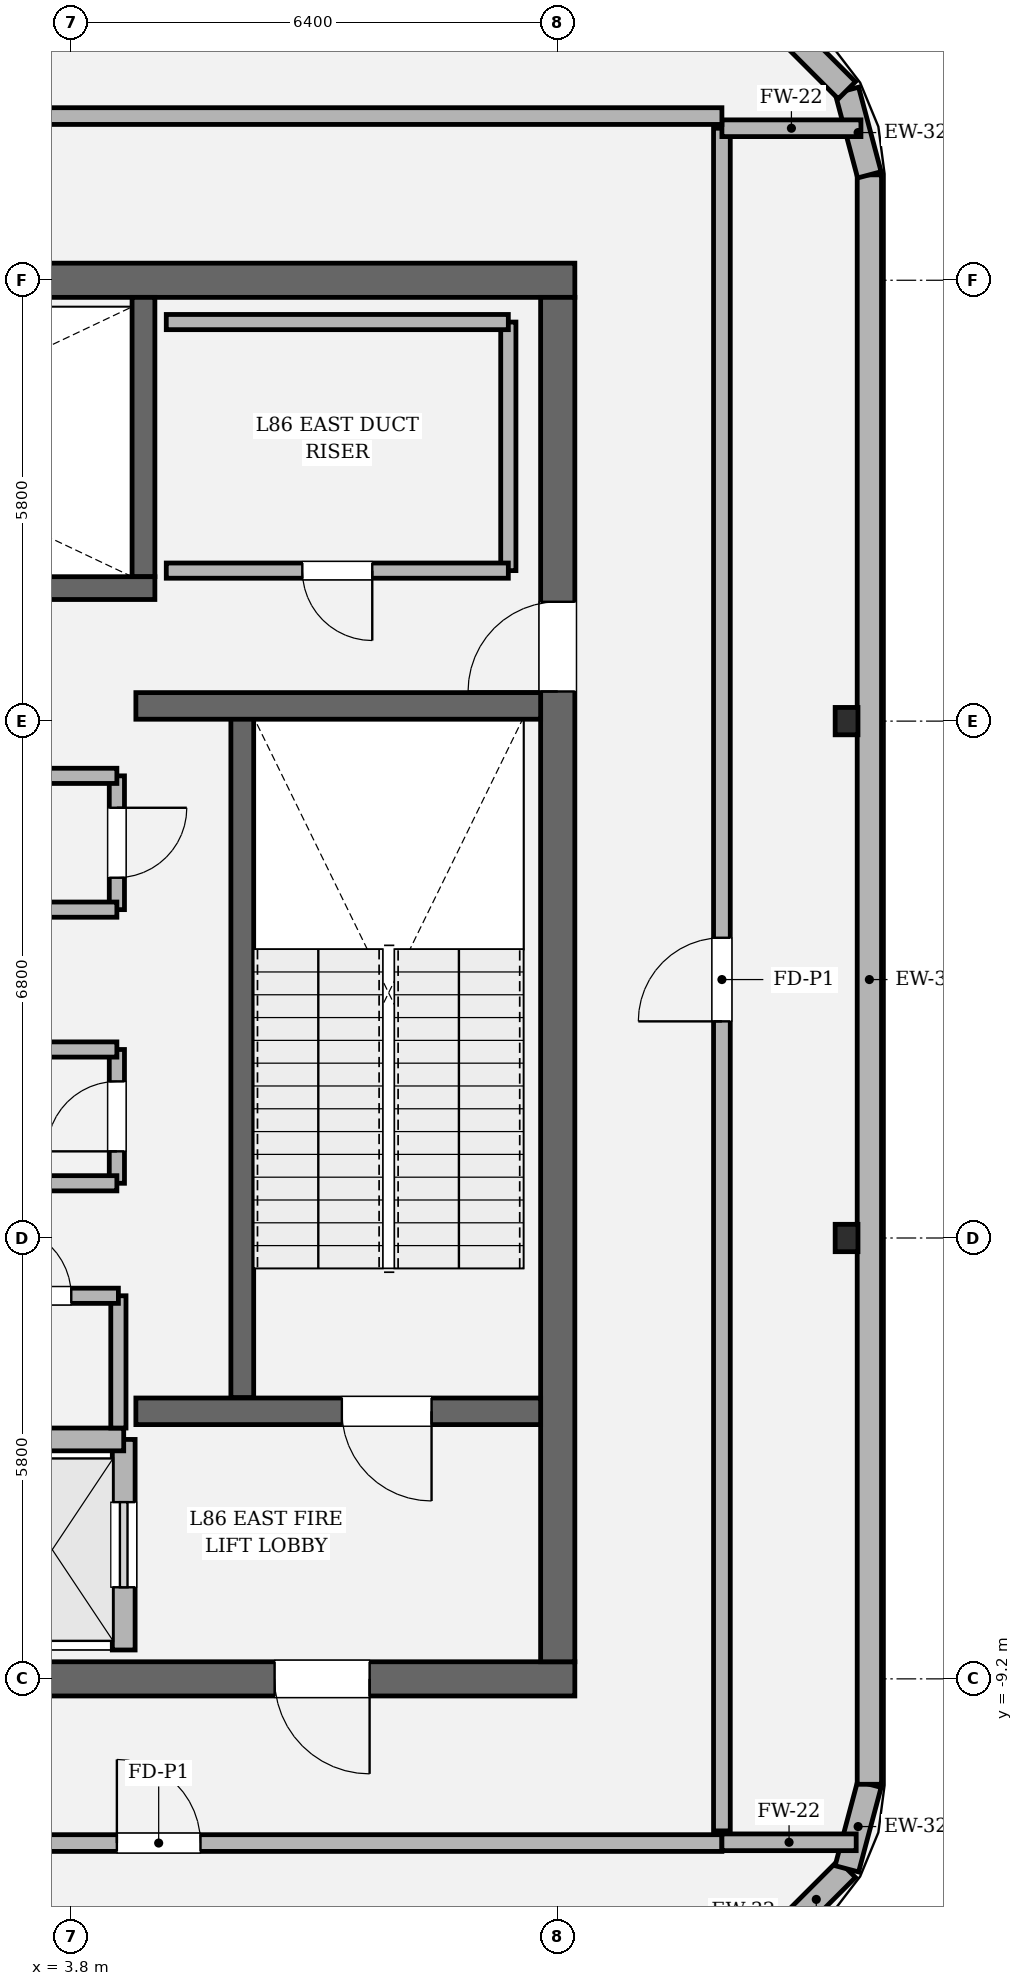
"""IFC4 building model, lengths in metres.
Left out: names, types, materials, properties, quantities, classifications, styles, units other than length and angle.
Written with IfcOpenShell. Run it as: python <this file> out.ifc"""

import sys

from ifc_helpers import new_model, si_unit, direction, frame, frame_2d, origin, origin_2d, place, context, subcontext, project, spatial, rectangle, i_section, extrude, element, fill, save


model = new_model("IFC4")
c1 = context("Model", 3, precision=1e-05, world=origin(), true_north=direction((0.0, 1.0)))
c2 = subcontext(c1, "Body", "Model", "MODEL_VIEW")
j1 = project(units=[si_unit("LENGTHUNIT", "METRE"), si_unit("PLANEANGLEUNIT", "RADIAN")], contexts=[c1])
p1 = place(None, origin())
s1 = spatial("IfcSite", under=j1, at=p1, CompositionType="ELEMENT")
p2 = place(p1, origin())
s2 = spatial("IfcBuilding", under=s1, at=p2, CompositionType="ELEMENT")
p3 = place(p2, frame((0.0, 0.0, 366.3)))
s3 = spatial("IfcBuildingStorey", under=s2, at=p3, CompositionType="ELEMENT", Elevation=366.3)
p4 = place(p3, frame((10.425, -9.2, 0.0), z_axis=(0.0, 0.0, 1.0), x_axis=(-1.0, 0.0, 0.0)))
e1 = element("IfcWall", 1, at=p4, inside=s3, PredefinedType="SHEAR", context=c2, shape_type="SweptSolid", body=[
    extrude(rectangle(XDim=20.85, YDim=0.45, at=frame_2d((10.425, 0.0))), origin(), (0.0, 0.0, 1.0), 4.5),
])
p5 = place(p4, frame((2.7, 0.0, 0.0)))
e2 = element("IfcOpeningElement", 2, at=p5, cuts=e1, PredefinedType="OPENING", context=c2, shape_type="SweptSolid", body=[
    extrude(rectangle(XDim=1.25, YDim=2.25, at=frame_2d((0.625, 1.125))), frame((0.0, 0.235, 0.0), z_axis=(0.0, -1.0, 0.0), x_axis=(1.0, 0.0, 0.0)), (0.0, 0.0, 1.0), 0.47),
])
p6 = place(p4, frame((16.9, 0.0, 0.0)))
e3 = element("IfcOpeningElement", 3, at=p6, cuts=e1, PredefinedType="OPENING", context=c2, shape_type="SweptSolid", body=[
    extrude(rectangle(XDim=1.25, YDim=2.25, at=frame_2d((0.625, 1.125))), frame((0.0, 0.235, 0.0), z_axis=(0.0, -1.0, 0.0), x_axis=(1.0, 0.0, 0.0)), (0.0, 0.0, 1.0), 0.47),
])
p7 = place(p3, frame((-10.425, 9.2, 0.0), z_axis=(0.0, 0.0, 1.0), x_axis=(1.0, 0.0, 0.0)))
e4 = element("IfcWall", 4, at=p7, inside=s3, PredefinedType="SHEAR", context=c2, shape_type="SweptSolid", body=[
    extrude(rectangle(XDim=20.85, YDim=0.45, at=frame_2d((10.425, 0.0))), origin(), (0.0, 0.0, 1.0), 4.5),
])
p8 = place(p3, frame((10.2, 8.975, 0.0), z_axis=(0.0, 0.0, 1.0), x_axis=(0.0, -1.0, 0.0)))
e5 = element("IfcWall", 5, at=p8, inside=s3, PredefinedType="SHEAR", context=c2, shape_type="SweptSolid", body=[
    extrude(rectangle(XDim=17.95, YDim=0.45, at=frame_2d((8.975, 0.0))), origin(), (0.0, 0.0, 1.0), 4.5),
])
p9 = place(p8, frame((4.005, 0.0, 0.0)))
e6 = element("IfcOpeningElement", 6, at=p9, cuts=e5, PredefinedType="OPENING", context=c2, shape_type="SweptSolid", body=[
    extrude(rectangle(XDim=1.18, YDim=2.2, at=frame_2d((0.59, 1.1))), frame((0.0, 0.235, 0.0), z_axis=(0.0, -1.0, 0.0), x_axis=(1.0, 0.0, 0.0)), (0.0, 0.0, 1.0), 0.47),
])
p10 = place(p3, frame((6.05, 3.45, 0.0), z_axis=(0.0, 0.0, 1.0), x_axis=(0.0, -1.0, 0.0)))
e7 = element("IfcWall", 7, at=p10, inside=s3, PredefinedType="SOLIDWALL", context=c2, shape_type="SweptSolid", body=[
    extrude(rectangle(XDim=8.95, YDim=0.3, at=frame_2d((4.475, 0.0))), origin(), (0.0, 0.0, 1.0), 4.5),
])
p11 = place(p3, frame((4.75, 8.975, 0.0), z_axis=(0.0, 0.0, 1.0), x_axis=(0.0, -1.0, 0.0)))
e8 = element("IfcWall", 8, at=p11, inside=s3, PredefinedType="SOLIDWALL", context=c2, shape_type="SweptSolid", body=[
    extrude(rectangle(XDim=3.675, YDim=0.3, at=frame_2d((1.837, 0.0))), origin(), (0.0, 0.0, 1.0), 4.5),
])
p12 = place(p3, frame((-4.9, 5.15, 0.0), z_axis=(0.0, 0.0, 1.0), x_axis=(1.0, 0.0, 0.0)))
e9 = element("IfcWall", 9, at=p12, inside=s3, PredefinedType="SOLIDWALL", context=c2, shape_type="SweptSolid", body=[
    extrude(rectangle(XDim=9.8, YDim=0.3, at=frame_2d((4.9, 0.0))), origin(), (0.0, 0.0, 1.0), 4.5),
])
p13 = place(p12, frame((0.56, 0.0, 0.0)))
e10 = element("IfcOpeningElement", 10, at=p13, cuts=e9, PredefinedType="OPENING", context=c2, shape_type="SweptSolid", body=[
    extrude(rectangle(XDim=1.18, YDim=2.2, at=frame_2d((0.59, 1.1))), frame((0.0, 0.16, 0.0), z_axis=(0.0, -1.0, 0.0), x_axis=(1.0, 0.0, 0.0)), (0.0, 0.0, 1.0), 0.32),
])
p14 = place(p3, frame((4.65, -5.68, 0.0), z_axis=(0.0, 0.0, 1.0), x_axis=(1.0, 0.0, 0.0)))
e11 = element("IfcWall", 11, at=p14, inside=s3, PredefinedType="SOLIDWALL", context=c2, shape_type="SweptSolid", body=[
    extrude(rectangle(XDim=5.325, YDim=0.35, at=frame_2d((2.663, 0.0))), origin(), (0.0, 0.0, 1.0), 4.5),
])
p15 = place(p14, frame((2.71, 0.0, 0.0)))
e12 = element("IfcOpeningElement", 12, at=p15, cuts=e11, PredefinedType="OPENING", context=c2, shape_type="SweptSolid", body=[
    extrude(rectangle(XDim=1.18, YDim=2.2, at=frame_2d((0.59, 1.1))), frame((0.0, 0.185, 0.0), z_axis=(0.0, -1.0, 0.0), x_axis=(1.0, 0.0, 0.0)), (0.0, 0.0, 1.0), 0.37),
])
p16 = place(p3, frame((4.65, 3.6, 0.0), z_axis=(0.0, 0.0, 1.0), x_axis=(1.0, 0.0, 0.0)))
e13 = element("IfcWall", 13, at=p16, inside=s3, PredefinedType="SOLIDWALL", context=c2, shape_type="SweptSolid", body=[
    extrude(rectangle(XDim=5.325, YDim=0.35, at=frame_2d((2.663, 0.0))), origin(), (0.0, 0.0, 1.0), 4.5),
])
for number, where, z_axis, x_axis in (
    (14, (14.0, -3.4, 0.0), (0.0, 0.0, 1.0), (1.0, 0.0, 0.0)),
    (15, (14.0, 3.4, 0.0), (0.0, 0.0, 1.0), (1.0, 0.0, 0.0)),
):
    element("IfcColumn", number, at=place(p3, frame(where, z_axis=z_axis, x_axis=x_axis)), inside=s3, PredefinedType="COLUMN", context=c2, shape_type="SweptSolid", body=[
        extrude(i_section(OverallWidth=0.3, OverallDepth=0.36, WebThickness=0.012, FlangeThickness=0.022, FilletRadius=0.018, at=origin_2d()), origin(), (0.0, 0.0, 1.0), 4.498),
    ])
p17 = place(p3, frame((13.199, -12.504, 0.0), z_axis=(0.0, 0.0, 1.0), x_axis=(0.707106781187, 0.707106781187, 0.0)))
e16 = element("IfcWall", 16, at=p17, inside=s3, PredefinedType="SOLIDWALL", context=c2, shape_type="SweptSolid", body=[
    extrude(rectangle(XDim=1.138, YDim=0.32, at=frame_2d((0.569, 0.0))), origin(), (0.0, 0.0, 1.0), 3.924),
])
p18 = place(p3, frame((14.004, -11.699, 0.0), z_axis=(0.0, 0.0, 1.0), x_axis=(0.25727979053, 0.966336954372, 0.0)))
e17 = element("IfcWall", 17, at=p18, inside=s3, PredefinedType="SOLIDWALL", context=c2, shape_type="SweptSolid", body=[
    extrude(rectangle(XDim=1.151, YDim=0.32, at=frame_2d((0.576, 0.0))), origin(), (0.0, 0.0, 1.0), 3.924),
])
p19 = place(p3, frame((14.3, -10.587, 0.0), z_axis=(0.0, 0.0, 1.0), x_axis=(0.0, 1.0, 0.0)))
e18 = element("IfcWall", 18, at=p19, inside=s3, PredefinedType="SOLIDWALL", context=c2, shape_type="SweptSolid", body=[
    extrude(rectangle(XDim=21.174, YDim=0.32, at=frame_2d((10.587, 0.0))), origin(), (0.0, 0.0, 1.0), 3.924),
])
p20 = place(p3, frame((14.3, 10.587, 0.0), z_axis=(0.0, 0.0, 1.0), x_axis=(-0.25727979053, 0.966336954372, 0.0)))
e19 = element("IfcWall", 19, at=p20, inside=s3, PredefinedType="SOLIDWALL", context=c2, shape_type="SweptSolid", body=[
    extrude(rectangle(XDim=1.151, YDim=0.32, at=frame_2d((0.576, 0.0))), origin(), (0.0, 0.0, 1.0), 3.924),
])
p21 = place(p3, frame((14.004, 11.699, 0.0), z_axis=(0.0, 0.0, 1.0), x_axis=(-0.707106781187, 0.707106781187, 0.0)))
e20 = element("IfcWall", 20, at=p21, inside=s3, PredefinedType="SOLIDWALL", context=c2, shape_type="SweptSolid", body=[
    extrude(rectangle(XDim=1.138, YDim=0.32, at=frame_2d((0.569, 0.0))), origin(), (0.0, 0.0, 1.0), 3.924),
])
p22 = place(p3, frame((4.49, -8.82, 0.0), z_axis=(0.0, 0.0, 1.0), x_axis=(0.0, 1.0, 0.0)))
e21 = element("IfcWall", 21, at=p22, inside=s3, PredefinedType="SOLIDWALL", context=c2, shape_type="SweptSolid", body=[
    extrude(rectangle(XDim=2.77, YDim=0.3, at=frame_2d((1.385, 0.0))), origin(), (0.0, 0.0, 1.0), 4.25),
])
p23 = place(p22, frame((0.825, 0.0, 0.0)))
e22 = element("IfcOpeningElement", 22, at=p23, cuts=e21, PredefinedType="OPENING", context=c2, shape_type="SweptSolid", body=[
    extrude(rectangle(XDim=1.12, YDim=2.25, at=frame_2d((0.56, 1.125))), frame((0.0, 0.16, 0.0), z_axis=(0.0, -1.0, 0.0), x_axis=(1.0, 0.0, 0.0)), (0.0, 0.0, 1.0), 0.32),
])
p24 = place(p3, frame((2.61, -6.05, 0.0), z_axis=(0.0, 0.0, 1.0), x_axis=(1.0, 0.0, 0.0)))
e23 = element("IfcWall", 23, at=p24, inside=s3, PredefinedType="SOLIDWALL", context=c2, shape_type="SweptSolid", body=[
    extrude(rectangle(XDim=1.88, YDim=0.3, at=frame_2d((0.94, 0.0))), origin(), (0.0, 0.0, 1.0), 4.25),
])
p25 = place(p3, frame((4.42, -5.9, 0.0), z_axis=(0.0, 0.0, 1.0), x_axis=(0.0, 1.0, 0.0)))
e24 = element("IfcWall", 24, at=p25, inside=s3, PredefinedType="SOLIDWALL", context=c2, shape_type="SweptSolid", body=[
    extrude(rectangle(XDim=1.74, YDim=0.2, at=frame_2d((0.87, 0.0))), origin(), (0.0, 0.0, 1.0), 4.25),
])
p26 = place(p3, frame((4.42, -4.16, 0.0), z_axis=(0.0, 0.0, 1.0), x_axis=(-1.0, 0.0, 0.0)))
e25 = element("IfcWall", 25, at=p26, inside=s3, PredefinedType="SOLIDWALL", context=c2, shape_type="SweptSolid", body=[
    extrude(rectangle(XDim=2.16, YDim=0.2, at=frame_2d((1.08, 0.0))), origin(), (0.0, 0.0, 1.0), 4.25),
])
p27 = place(p26, frame((0.62, 0.0, 0.0)))
e26 = element("IfcOpeningElement", 26, at=p27, cuts=e25, PredefinedType="OPENING", context=c2, shape_type="SweptSolid", body=[
    extrude(rectangle(XDim=0.92, YDim=2.1, at=frame_2d((0.46, 1.05))), frame((0.0, 0.11, 0.0), z_axis=(0.0, -1.0, 0.0), x_axis=(1.0, 0.0, 0.0)), (0.0, 0.0, 1.0), 0.22),
])
p28 = place(p3, frame((4.4, -2.68, 0.0), z_axis=(0.0, 0.0, 1.0), x_axis=(0.0, 1.0, 0.0)))
e27 = element("IfcWall", 27, at=p28, inside=s3, PredefinedType="SOLIDWALL", context=c2, shape_type="SweptSolid", body=[
    extrude(rectangle(XDim=1.76, YDim=0.2, at=frame_2d((0.88, 0.0))), origin(), (0.0, 0.0, 1.0), 4.25),
])
p29 = place(p28, frame((0.42, 0.0, 0.0)))
e28 = element("IfcOpeningElement", 28, at=p29, cuts=e27, PredefinedType="OPENING", context=c2, shape_type="SweptSolid", body=[
    extrude(rectangle(XDim=0.92, YDim=2.1, at=frame_2d((0.46, 1.05))), frame((0.0, 0.11, 0.0), z_axis=(0.0, -1.0, 0.0), x_axis=(1.0, 0.0, 0.0)), (0.0, 0.0, 1.0), 0.22),
])
for number, where, z_axis, x_axis in (
    (29, (4.4, -0.92, 0.0), (0.0, 0.0, 1.0), (-1.0, 0.0, 0.0)),
    (30, (-4.4, -2.68, 0.0), (0.0, 0.0, 1.0), (1.0, 0.0, 0.0)),
):
    element("IfcWall", number, at=place(p3, frame(where, z_axis=z_axis, x_axis=x_axis)), inside=s3, PredefinedType="SOLIDWALL", context=c2, shape_type="SweptSolid", body=[
        extrude(rectangle(XDim=8.8, YDim=0.2, at=frame_2d((4.4, 0.0))), origin(), (0.0, 0.0, 1.0), 4.25),
    ])
p30 = place(p3, frame((4.4, 0.92, 0.0), z_axis=(0.0, 0.0, 1.0), x_axis=(0.0, 1.0, 0.0)))
e31 = element("IfcWall", 31, at=p30, inside=s3, PredefinedType="SOLIDWALL", context=c2, shape_type="SweptSolid", body=[
    extrude(rectangle(XDim=1.76, YDim=0.2, at=frame_2d((0.88, 0.0))), origin(), (0.0, 0.0, 1.0), 4.25),
])
p31 = place(p30, frame((0.42, 0.0, 0.0)))
e32 = element("IfcOpeningElement", 32, at=p31, cuts=e31, PredefinedType="OPENING", context=c2, shape_type="SweptSolid", body=[
    extrude(rectangle(XDim=0.92, YDim=2.1, at=frame_2d((0.46, 1.05))), frame((0.0, 0.11, 0.0), z_axis=(0.0, -1.0, 0.0), x_axis=(1.0, 0.0, 0.0)), (0.0, 0.0, 1.0), 0.22),
])
for number, where, z_axis, x_axis in (
    (33, (4.4, 2.68, 0.0), (0.0, 0.0, 1.0), (-1.0, 0.0, 0.0)),
    (34, (-4.4, 0.92, 0.0), (0.0, 0.0, 1.0), (1.0, 0.0, 0.0)),
):
    element("IfcWall", number, at=place(p3, frame(where, z_axis=z_axis, x_axis=x_axis)), inside=s3, PredefinedType="SOLIDWALL", context=c2, shape_type="SweptSolid", body=[
        extrude(rectangle(XDim=8.8, YDim=0.2, at=frame_2d((4.4, 0.0))), origin(), (0.0, 0.0, 1.0), 4.25),
    ])
p32 = place(p3, frame((9.55, 5.38, 0.0), z_axis=(0.0, 0.0, 1.0), x_axis=(0.0, 1.0, 0.0)))
e35 = element("IfcWall", 35, at=p32, inside=s3, PredefinedType="SOLIDWALL", context=c2, shape_type="SweptSolid", body=[
    extrude(rectangle(XDim=3.27, YDim=0.2, at=frame_2d((1.635, 0.0))), origin(), (0.0, 0.0, 1.0), 4.25),
])
p33 = place(p3, frame((9.55, 8.65, 0.0), z_axis=(0.0, 0.0, 1.0), x_axis=(-1.0, 0.0, 0.0)))
e36 = element("IfcWall", 36, at=p33, inside=s3, PredefinedType="SOLIDWALL", context=c2, shape_type="SweptSolid", body=[
    extrude(rectangle(XDim=4.5, YDim=0.2, at=frame_2d((2.25, 0.0))), origin(), (0.0, 0.0, 1.0), 4.25),
])
p34 = place(p3, frame((5.05, 5.38, 0.0), z_axis=(0.0, 0.0, 1.0), x_axis=(1.0, 0.0, 0.0)))
e37 = element("IfcWall", 37, at=p34, inside=s3, PredefinedType="SOLIDWALL", context=c2, shape_type="SweptSolid", body=[
    extrude(rectangle(XDim=4.5, YDim=0.2, at=frame_2d((2.25, 0.0))), origin(), (0.0, 0.0, 1.0), 4.25),
])
p35 = place(p34, frame((1.79, 0.0, 0.0)))
e38 = element("IfcOpeningElement", 38, at=p35, cuts=e37, PredefinedType="OPENING", context=c2, shape_type="SweptSolid", body=[
    extrude(rectangle(XDim=0.92, YDim=2.1, at=frame_2d((0.46, 1.05))), frame((0.0, 0.11, 0.0), z_axis=(0.0, -1.0, 0.0), x_axis=(1.0, 0.0, 0.0)), (0.0, 0.0, 1.0), 0.22),
])
p36 = place(p3, frame((-12.36, -11.36, 0.0), z_axis=(0.0, 0.0, 1.0), x_axis=(1.0, 0.0, 0.0)))
e39 = element("IfcWall", 39, at=p36, inside=s3, PredefinedType="SOLIDWALL", context=c2, shape_type="SweptSolid", body=[
    extrude(rectangle(XDim=24.72, YDim=0.22, at=frame_2d((12.36, 0.0))), origin(), (0.0, 0.0, 1.0), 3.924),
])
p37 = place(p36, frame((16.76, 0.0, 0.0)))
e40 = element("IfcOpeningElement", 40, at=p37, cuts=e39, PredefinedType="OPENING", context=c2, shape_type="SweptSolid", body=[
    extrude(rectangle(XDim=1.1, YDim=2.2, at=frame_2d((0.55, 1.1))), frame((0.0, 0.12, 0.0), z_axis=(0.0, -1.0, 0.0), x_axis=(1.0, 0.0, 0.0)), (0.0, 0.0, 1.0), 0.24),
])
p38 = place(p3, frame((12.36, -11.35, 0.0), z_axis=(0.0, 0.0, 1.0), x_axis=(1.0, 0.0, 0.0)))
e41 = element("IfcWall", 41, at=p38, inside=s3, PredefinedType="SOLIDWALL", context=c2, shape_type="SweptSolid", body=[
    extrude(rectangle(XDim=1.767, YDim=0.22, at=frame_2d((0.883, 0.0))), origin(), (0.0, 0.0, 1.0), 3.924),
])
p39 = place(p3, frame((12.36, -11.2, 0.0), z_axis=(0.0, 0.0, 1.0), x_axis=(0.0, 1.0, 0.0)))
e42 = element("IfcWall", 42, at=p39, inside=s3, PredefinedType="SOLIDWALL", context=c2, shape_type="SweptSolid", body=[
    extrude(rectangle(XDim=22.4, YDim=0.22, at=frame_2d((11.2, 0.0))), origin(), (0.0, 0.0, 1.0), 3.924),
])
p40 = place(p39, frame((10.65, 0.0, 0.0)))
e43 = element("IfcOpeningElement", 43, at=p40, cuts=e42, PredefinedType="OPENING", context=c2, shape_type="SweptSolid", body=[
    extrude(rectangle(XDim=1.1, YDim=2.2, at=frame_2d((0.55, 1.1))), frame((0.0, 0.12, 0.0), z_axis=(0.0, -1.0, 0.0), x_axis=(1.0, 0.0, 0.0)), (0.0, 0.0, 1.0), 0.24),
])
p41 = place(p3, frame((12.36, 11.2, 0.0), z_axis=(0.0, 0.0, 1.0), x_axis=(1.0, 0.0, 0.0)))
e44 = element("IfcWall", 44, at=p41, inside=s3, PredefinedType="SOLIDWALL", context=c2, shape_type="SweptSolid", body=[
    extrude(rectangle(XDim=1.829, YDim=0.22, at=frame_2d((0.915, 0.0))), origin(), (0.0, 0.0, 1.0), 3.924),
])
p42 = place(p3, frame((12.36, 11.36, 0.0), z_axis=(0.0, 0.0, 1.0), x_axis=(-1.0, 0.0, 0.0)))
e45 = element("IfcWall", 45, at=p42, inside=s3, PredefinedType="SOLIDWALL", context=c2, shape_type="SweptSolid", body=[
    extrude(rectangle(XDim=24.72, YDim=0.22, at=frame_2d((12.36, 0.0))), origin(), (0.0, 0.0, 1.0), 3.924),
])
p43 = place(p42, frame((16.76, 0.0, 0.0)))
e46 = element("IfcOpeningElement", 46, at=p43, cuts=e45, PredefinedType="OPENING", context=c2, shape_type="SweptSolid", body=[
    extrude(rectangle(XDim=1.1, YDim=2.2, at=frame_2d((0.55, 1.1))), frame((0.0, 0.12, 0.0), z_axis=(0.0, -1.0, 0.0), x_axis=(1.0, 0.0, 0.0)), (0.0, 0.0, 1.0), 0.24),
])
p44 = place(p15, origin())
e47 = element("IfcDoor", 47, at=p44, inside=s3, OperationType="SINGLE_SWING_RIGHT", PredefinedType="DOOR", context=c2, shape_type="SweptSolid", body=[
    extrude(rectangle(XDim=1.18, YDim=2.2, at=frame_2d((0.59, 1.1))), frame((0.0, 0.025, 0.0), z_axis=(0.0, -1.0, 0.0), x_axis=(1.0, 0.0, 0.0)), (0.0, 0.0, 1.0), 0.05),
])
fill(e12, e47)
p45 = place(p5, origin())
e48 = element("IfcDoor", 48, at=p45, inside=s3, OperationType="SINGLE_SWING_LEFT", PredefinedType="DOOR", context=c2, shape_type="SweptSolid", body=[
    extrude(rectangle(XDim=1.25, YDim=2.25, at=frame_2d((0.625, 1.125))), frame((0.0, 0.025, 0.0), z_axis=(0.0, -1.0, 0.0), x_axis=(1.0, 0.0, 0.0)), (0.0, 0.0, 1.0), 0.05),
])
fill(e2, e48)
p46 = place(p9, origin())
e49 = element("IfcDoor", 49, at=p46, inside=s3, OperationType="SINGLE_SWING_RIGHT", PredefinedType="DOOR", context=c2, shape_type="SweptSolid", body=[
    extrude(rectangle(XDim=1.18, YDim=2.2, at=frame_2d((0.59, 1.1))), frame((0.0, 0.025, 0.0), z_axis=(0.0, -1.0, 0.0), x_axis=(1.0, 0.0, 0.0)), (0.0, 0.0, 1.0), 0.05),
])
fill(e6, e49)
p47 = place(p23, origin())
e50 = element("IfcDoor", 50, at=p47, inside=s3, OperationType="SLIDING_TO_RIGHT", PredefinedType="DOOR", context=c2, shape_type="SweptSolid", body=[
    extrude(rectangle(XDim=1.12, YDim=2.25, at=frame_2d((0.56, 1.125))), frame((0.0, 0.025, 0.0), z_axis=(0.0, -1.0, 0.0), x_axis=(1.0, 0.0, 0.0)), (0.0, 0.0, 1.0), 0.05),
])
fill(e22, e50)
p48 = place(p27, origin())
e51 = element("IfcDoor", 51, at=p48, inside=s3, OperationType="SINGLE_SWING_RIGHT", PredefinedType="DOOR", context=c2, shape_type="SweptSolid", body=[
    extrude(rectangle(XDim=0.92, YDim=2.1, at=frame_2d((0.46, 1.05))), frame((0.0, 0.025, 0.0), z_axis=(0.0, -1.0, 0.0), x_axis=(1.0, 0.0, 0.0)), (0.0, 0.0, 1.0), 0.05),
])
fill(e26, e51)
p49 = place(p29, origin())
e52 = element("IfcDoor", 52, at=p49, inside=s3, OperationType="SINGLE_SWING_LEFT", PredefinedType="DOOR", context=c2, shape_type="SweptSolid", body=[
    extrude(rectangle(XDim=0.92, YDim=2.1, at=frame_2d((0.46, 1.05))), frame((0.0, 0.025, 0.0), z_axis=(0.0, -1.0, 0.0), x_axis=(1.0, 0.0, 0.0)), (0.0, 0.0, 1.0), 0.05),
])
fill(e28, e52)
p50 = place(p31, origin())
e53 = element("IfcDoor", 53, at=p50, inside=s3, OperationType="SINGLE_SWING_RIGHT", PredefinedType="DOOR", context=c2, shape_type="SweptSolid", body=[
    extrude(rectangle(XDim=0.92, YDim=2.1, at=frame_2d((0.46, 1.05))), frame((0.0, 0.025, 0.0), z_axis=(0.0, -1.0, 0.0), x_axis=(1.0, 0.0, 0.0)), (0.0, 0.0, 1.0), 0.05),
])
fill(e32, e53)
p51 = place(p35, origin())
e54 = element("IfcDoor", 54, at=p51, inside=s3, OperationType="SINGLE_SWING_RIGHT", PredefinedType="DOOR", context=c2, shape_type="SweptSolid", body=[
    extrude(rectangle(XDim=0.92, YDim=2.1, at=frame_2d((0.46, 1.05))), frame((0.0, 0.025, 0.0), z_axis=(0.0, -1.0, 0.0), x_axis=(1.0, 0.0, 0.0)), (0.0, 0.0, 1.0), 0.05),
])
fill(e38, e54)
p52 = place(p37, origin())
e55 = element("IfcDoor", 55, at=p52, inside=s3, OperationType="SINGLE_SWING_LEFT", PredefinedType="DOOR", context=c2, shape_type="SweptSolid", body=[
    extrude(rectangle(XDim=1.1, YDim=2.2, at=frame_2d((0.55, 1.1))), frame((0.0, 0.025, 0.0), z_axis=(0.0, -1.0, 0.0), x_axis=(1.0, 0.0, 0.0)), (0.0, 0.0, 1.0), 0.05),
])
fill(e40, e55)
p53 = place(p40, origin())
e56 = element("IfcDoor", 56, at=p53, inside=s3, OperationType="SINGLE_SWING_LEFT", PredefinedType="DOOR", context=c2, shape_type="SweptSolid", body=[
    extrude(rectangle(XDim=1.1, YDim=2.2, at=frame_2d((0.55, 1.1))), frame((0.0, 0.025, 0.0), z_axis=(0.0, -1.0, 0.0), x_axis=(1.0, 0.0, 0.0)), (0.0, 0.0, 1.0), 0.05),
])
fill(e43, e56)
save(model, sys.argv[1])
